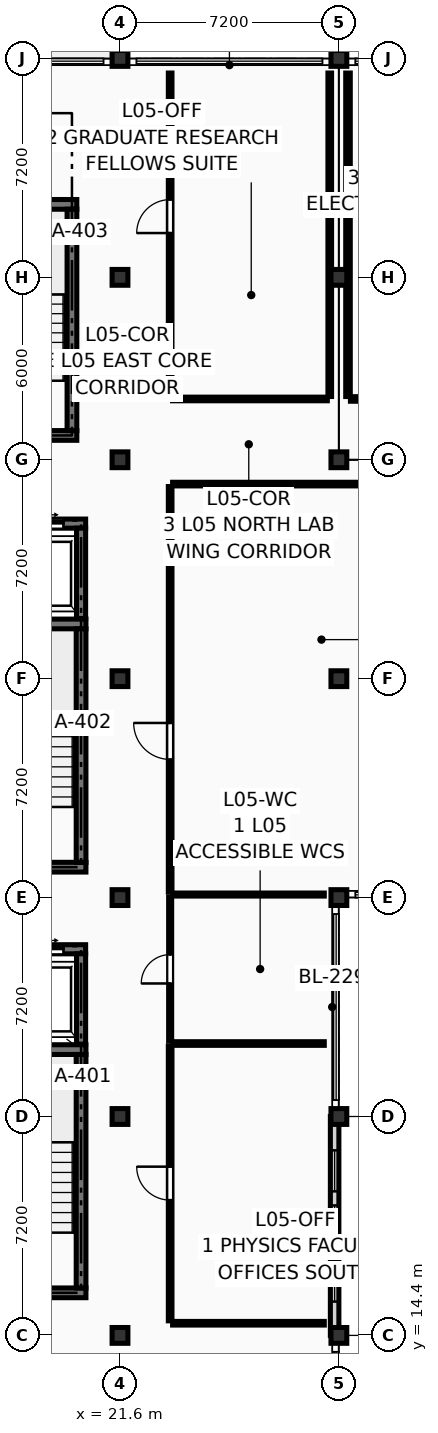
"""IFC4 building model, lengths in metres.
Left out: names, types, materials, properties, quantities, classifications, styles, units other than length and angle.
Written with IfcOpenShell. Run it as: python <this file> out.ifc"""

import sys

from ifc_helpers import new_model, si_unit, direction, frame, frame_2d, origin, origin_2d, place, context, subcontext, project, spatial, rectangle, extrude, element, fill, save


model = new_model("IFC4")
c1 = context("Model", 3, precision=1e-05, world=origin(), true_north=direction((0.0, 1.0)))
c2 = subcontext(c1, "Body", "Model", "MODEL_VIEW")
j1 = project(units=[si_unit("LENGTHUNIT", "METRE"), si_unit("PLANEANGLEUNIT", "RADIAN")], contexts=[c1])
p1 = place(None, origin())
s1 = spatial("IfcSite", under=j1, at=p1, CompositionType="ELEMENT")
p2 = place(p1, origin())
s2 = spatial("IfcBuilding", under=s1, at=p2, CompositionType="ELEMENT")
p3 = place(p2, frame((0.0, 0.0, 19.35)))
s3 = spatial("IfcBuildingStorey", under=s2, at=p3, CompositionType="ELEMENT", Elevation=19.35)
for number, where, z_axis, x_axis in (
    (1, (21.6, 14.4, 0.0), (0.0, 0.0, 1.0), (1.0, 0.0, 0.0)),
    (2, (21.6, 21.6, 0.0), (0.0, 0.0, 1.0), (1.0, 0.0, 0.0)),
    (3, (21.6, 28.8, 0.0), (0.0, 0.0, 1.0), (1.0, 0.0, 0.0)),
    (4, (21.6, 36.0, 0.0), (0.0, 0.0, 1.0), (1.0, 0.0, 0.0)),
    (5, (21.6, 43.2, 0.0), (0.0, 0.0, 1.0), (1.0, 0.0, 0.0)),
    (6, (21.6, 49.2, 0.0), (0.0, 0.0, 1.0), (1.0, 0.0, 0.0)),
    (7, (21.6, 56.4, 0.0), (0.0, 0.0, 1.0), (1.0, 0.0, 0.0)),
    (8, (28.8, 14.4, 0.0), (0.0, 0.0, 1.0), (1.0, 0.0, 0.0)),
    (9, (28.8, 21.6, 0.0), (0.0, 0.0, 1.0), (1.0, 0.0, 0.0)),
    (10, (28.8, 28.8, 0.0), (0.0, 0.0, 1.0), (1.0, 0.0, 0.0)),
    (11, (28.8, 36.0, 0.0), (0.0, 0.0, 1.0), (1.0, 0.0, 0.0)),
    (12, (28.8, 43.2, 0.0), (0.0, 0.0, 1.0), (1.0, 0.0, 0.0)),
    (13, (28.8, 49.2, 0.0), (0.0, 0.0, 1.0), (1.0, 0.0, 0.0)),
    (14, (28.8, 56.4, 0.0), (0.0, 0.0, 1.0), (1.0, 0.0, 0.0)),
):
    element("IfcColumn", number, at=place(p3, frame(where, z_axis=z_axis, x_axis=x_axis)), inside=s3, PredefinedType="COLUMN", context=c2, shape_type="SweptSolid", body=[
        extrude(rectangle(XDim=0.52, YDim=0.52, at=origin_2d()), origin(), (0.0, 0.0, 1.0), 3.6),
    ])
p4 = place(p3, frame((28.66, 14.4, 0.0), z_axis=(0.0, 0.0, 1.0), x_axis=(0.0, 1.0, 0.0)))
e15 = element("IfcWall", 15, at=p4, inside=s3, PredefinedType="SOLIDWALL", context=c2, shape_type="SweptSolid", body=[
    extrude(rectangle(XDim=7.2, YDim=0.28, at=frame_2d((3.6, 0.0))), origin(), (0.0, 0.0, 1.0), 2.84),
])
p5 = place(p4, frame((1.113, 0.0, 0.18)))
e16 = element("IfcOpeningElement", 16, at=p5, cuts=e15, PredefinedType="OPENING", context=c2, shape_type="SweptSolid", body=[
    extrude(rectangle(XDim=1.35, YDim=2.45, at=frame_2d((0.675, 1.225))), frame((0.0, 0.152, 0.0), z_axis=(0.0, -1.0, 0.0), x_axis=(1.0, 0.0, 0.0)), (0.0, 0.0, 1.0), 0.304),
])
p6 = place(p4, frame((2.925, 0.0, 0.18)))
e17 = element("IfcOpeningElement", 17, at=p6, cuts=e15, PredefinedType="OPENING", context=c2, shape_type="SweptSolid", body=[
    extrude(rectangle(XDim=1.35, YDim=2.45, at=frame_2d((0.675, 1.225))), frame((0.0, 0.152, 0.0), z_axis=(0.0, -1.0, 0.0), x_axis=(1.0, 0.0, 0.0)), (0.0, 0.0, 1.0), 0.304),
])
p7 = place(p4, frame((4.738, 0.0, 0.18)))
e18 = element("IfcOpeningElement", 18, at=p7, cuts=e15, PredefinedType="OPENING", context=c2, shape_type="SweptSolid", body=[
    extrude(rectangle(XDim=1.35, YDim=2.45, at=frame_2d((0.675, 1.225))), frame((0.0, 0.152, 0.0), z_axis=(0.0, -1.0, 0.0), x_axis=(1.0, 0.0, 0.0)), (0.0, 0.0, 1.0), 0.304),
])
for number, where, z_axis, x_axis in (
    (19, (15.64, 15.8, 0.0), (0.0, 0.0, 1.0), (1.0, 0.0, 0.0)),
    (20, (15.64, 23.8, 0.0), (0.0, 0.0, 1.0), (1.0, 0.0, 0.0)),
):
    element("IfcWall", number, at=place(p3, frame(where, z_axis=z_axis, x_axis=x_axis)), inside=s3, PredefinedType="SHEAR", context=c2, shape_type="SweptSolid", body=[
        extrude(rectangle(XDim=4.84, YDim=0.32, at=frame_2d((2.42, 0.0))), origin(), (0.0, 0.0, 1.0), 3.39),
    ])
p8 = place(p3, frame((20.32, 15.96, 0.0), z_axis=(0.0, 0.0, 1.0), x_axis=(0.0, 1.0, 0.0)))
e21 = element("IfcWall", 21, at=p8, inside=s3, PredefinedType="SHEAR", context=c2, shape_type="SweptSolid", body=[
    extrude(rectangle(XDim=7.68, YDim=0.32, at=frame_2d((3.84, 0.0))), origin(), (0.0, 0.0, 1.0), 3.39),
])
for number, where, z_axis, x_axis in (
    (22, (15.64, 29.8, 0.0), (0.0, 0.0, 1.0), (1.0, 0.0, 0.0)),
    (23, (15.64, 37.8, 0.0), (0.0, 0.0, 1.0), (1.0, 0.0, 0.0)),
):
    element("IfcWall", number, at=place(p3, frame(where, z_axis=z_axis, x_axis=x_axis)), inside=s3, PredefinedType="SHEAR", context=c2, shape_type="SweptSolid", body=[
        extrude(rectangle(XDim=4.84, YDim=0.32, at=frame_2d((2.42, 0.0))), origin(), (0.0, 0.0, 1.0), 3.39),
    ])
p9 = place(p3, frame((20.32, 29.96, 0.0), z_axis=(0.0, 0.0, 1.0), x_axis=(0.0, 1.0, 0.0)))
e24 = element("IfcWall", 24, at=p9, inside=s3, PredefinedType="SHEAR", context=c2, shape_type="SweptSolid", body=[
    extrude(rectangle(XDim=7.68, YDim=0.32, at=frame_2d((3.84, 0.0))), origin(), (0.0, 0.0, 1.0), 3.39),
])
for number, where, z_axis, x_axis in (
    (25, (15.74, 44.0, 0.0), (0.0, 0.0, 1.0), (1.0, 0.0, 0.0)),
    (26, (15.74, 51.6, 0.0), (0.0, 0.0, 1.0), (1.0, 0.0, 0.0)),
):
    element("IfcWall", number, at=place(p3, frame(where, z_axis=z_axis, x_axis=x_axis)), inside=s3, PredefinedType="SHEAR", context=c2, shape_type="SweptSolid", body=[
        extrude(rectangle(XDim=4.44, YDim=0.32, at=frame_2d((2.22, 0.0))), origin(), (0.0, 0.0, 1.0), 3.39),
    ])
p10 = place(p3, frame((20.02, 44.16, 0.0), z_axis=(0.0, 0.0, 1.0), x_axis=(0.0, 1.0, 0.0)))
e27 = element("IfcWall", 27, at=p10, inside=s3, PredefinedType="SHEAR", context=c2, shape_type="SweptSolid", body=[
    extrude(rectangle(XDim=7.28, YDim=0.32, at=frame_2d((3.64, 0.0))), origin(), (0.0, 0.0, 1.0), 3.39),
])
p11 = place(p3, frame((17.91, 27.1, 0.0), z_axis=(0.0, 0.0, 1.0), x_axis=(1.0, 0.0, 0.0)))
e28 = element("IfcWall", 28, at=p11, inside=s3, PredefinedType="SHEAR", context=c2, shape_type="SweptSolid", body=[
    extrude(rectangle(XDim=2.56, YDim=0.3, at=frame_2d((1.28, 0.0))), origin(), (0.0, 0.0, 1.0), 3.39),
])
p12 = place(p11, frame((0.73, 0.0, 0.0)))
e29 = element("IfcOpeningElement", 29, at=p12, cuts=e28, PredefinedType="OPENING", context=c2, shape_type="SweptSolid", body=[
    extrude(rectangle(XDim=1.1, YDim=2.2, at=frame_2d((0.55, 1.1))), frame((0.0, 0.162, 0.0), z_axis=(0.0, -1.0, 0.0), x_axis=(1.0, 0.0, 0.0)), (0.0, 0.0, 1.0), 0.324),
])
p13 = place(p3, frame((20.32, 23.98, 0.0), z_axis=(0.0, 0.0, 1.0), x_axis=(0.0, 1.0, 0.0)))
e30 = element("IfcWall", 30, at=p13, inside=s3, PredefinedType="SHEAR", context=c2, shape_type="SweptSolid", body=[
    extrude(rectangle(XDim=2.97, YDim=0.3, at=frame_2d((1.485, 0.0))), origin(), (0.0, 0.0, 1.0), 3.39),
])
p14 = place(p3, frame((17.91, 41.1, 0.0), z_axis=(0.0, 0.0, 1.0), x_axis=(1.0, 0.0, 0.0)))
e31 = element("IfcWall", 31, at=p14, inside=s3, PredefinedType="SHEAR", context=c2, shape_type="SweptSolid", body=[
    extrude(rectangle(XDim=2.56, YDim=0.3, at=frame_2d((1.28, 0.0))), origin(), (0.0, 0.0, 1.0), 3.39),
])
p15 = place(p14, frame((0.73, 0.0, 0.0)))
e32 = element("IfcOpeningElement", 32, at=p15, cuts=e31, PredefinedType="OPENING", context=c2, shape_type="SweptSolid", body=[
    extrude(rectangle(XDim=1.1, YDim=2.2, at=frame_2d((0.55, 1.1))), frame((0.0, 0.162, 0.0), z_axis=(0.0, -1.0, 0.0), x_axis=(1.0, 0.0, 0.0)), (0.0, 0.0, 1.0), 0.324),
])
p16 = place(p3, frame((20.32, 37.98, 0.0), z_axis=(0.0, 0.0, 1.0), x_axis=(0.0, 1.0, 0.0)))
e33 = element("IfcWall", 33, at=p16, inside=s3, PredefinedType="SHEAR", context=c2, shape_type="SweptSolid", body=[
    extrude(rectangle(XDim=2.97, YDim=0.3, at=frame_2d((1.485, 0.0))), origin(), (0.0, 0.0, 1.0), 3.39),
])
p17 = place(p3, frame((23.25, 14.88, 0.0), z_axis=(0.0, 0.0, 1.0), x_axis=(0.0, 1.0, 0.0)))
e34 = element("IfcWall", 34, at=p17, inside=s3, PredefinedType="PARTITIONING", context=c2, shape_type="SweptSolid", body=[
    extrude(rectangle(XDim=9.04, YDim=0.12, at=frame_2d((4.52, 0.0))), origin(), (0.0, 0.0, 1.0), 3.375),
])
p18 = place(p17, frame((3.97, 0.0, 0.0)))
e35 = element("IfcOpeningElement", 35, at=p18, cuts=e34, PredefinedType="OPENING", context=c2, shape_type="SweptSolid", body=[
    extrude(rectangle(XDim=1.1, YDim=2.15, at=frame_2d((0.55, 1.075))), frame((0.0, 0.072, 0.0), z_axis=(0.0, -1.0, 0.0), x_axis=(1.0, 0.0, 0.0)), (0.0, 0.0, 1.0), 0.144),
])
for number, where, z_axis, x_axis in (
    (36, (23.33, 14.8, 0.0), (0.0, 0.0, 1.0), (1.0, 0.0, 0.0)),
    (37, (23.33, 24.0, 0.0), (0.0, 0.0, 1.0), (1.0, 0.0, 0.0)),
):
    element("IfcWall", number, at=place(p3, frame(where, z_axis=z_axis, x_axis=x_axis)), inside=s3, PredefinedType="PARTITIONING", context=c2, shape_type="SweptSolid", body=[
        extrude(rectangle(XDim=4.99, YDim=0.12, at=frame_2d((2.495, 0.0))), origin(), (0.0, 0.0, 1.0), 3.375),
    ])
p19 = place(p3, frame((23.25, 24.08, 0.0), z_axis=(0.0, 0.0, 1.0), x_axis=(0.0, 1.0, 0.0)))
e38 = element("IfcWall", 38, at=p19, inside=s3, PredefinedType="PARTITIONING", context=c2, shape_type="SweptSolid", body=[
    extrude(rectangle(XDim=4.74, YDim=0.1, at=frame_2d((2.37, 0.0))), origin(), (0.0, 0.0, 1.0), 3.375),
])
p20 = place(p19, frame((1.895, 0.0, 0.0)))
e39 = element("IfcOpeningElement", 39, at=p20, cuts=e38, PredefinedType="OPENING", context=c2, shape_type="SweptSolid", body=[
    extrude(rectangle(XDim=0.95, YDim=2.1, at=frame_2d((0.475, 1.05))), frame((0.0, 0.062, 0.0), z_axis=(0.0, -1.0, 0.0), x_axis=(1.0, 0.0, 0.0)), (0.0, 0.0, 1.0), 0.124),
])
p21 = place(p3, frame((23.33, 28.9, 0.0), z_axis=(0.0, 0.0, 1.0), x_axis=(1.0, 0.0, 0.0)))
e40 = element("IfcWall", 40, at=p21, inside=s3, PredefinedType="PARTITIONING", context=c2, shape_type="SweptSolid", body=[
    extrude(rectangle(XDim=4.99, YDim=0.1, at=frame_2d((2.495, 0.0))), origin(), (0.0, 0.0, 1.0), 2.691),
])
p22 = place(p3, frame((23.25, 28.98, 0.0), z_axis=(0.0, 0.0, 1.0), x_axis=(0.0, 1.0, 0.0)))
e41 = element("IfcWall", 41, at=p22, inside=s3, PredefinedType="PARTITIONING", context=c2, shape_type="SweptSolid", body=[
    extrude(rectangle(XDim=13.34, YDim=0.12, at=frame_2d((6.67, 0.0))), origin(), (0.0, 0.0, 1.0), 3.375),
])
p23 = place(p22, frame((4.364, 0.0, 0.0)))
e42 = element("IfcOpeningElement", 42, at=p23, cuts=e41, PredefinedType="OPENING", context=c2, shape_type="SweptSolid", body=[
    extrude(rectangle(XDim=1.2, YDim=2.15, at=frame_2d((0.6, 1.075))), frame((0.0, 0.072, 0.0), z_axis=(0.0, -1.0, 0.0), x_axis=(1.0, 0.0, 0.0)), (0.0, 0.0, 1.0), 0.144),
])
p24 = place(p3, frame((23.33, 42.4, 0.0), z_axis=(0.0, 0.0, 1.0), x_axis=(1.0, 0.0, 0.0)))
e43 = element("IfcWall", 43, at=p24, inside=s3, PredefinedType="PARTITIONING", context=c2, shape_type="SweptSolid", body=[
    extrude(rectangle(XDim=9.69, YDim=0.12, at=frame_2d((4.845, 0.0))), origin(), (0.0, 0.0, 1.0), 3.375),
])
p25 = place(p3, frame((29.1, 45.28, 0.0), z_axis=(0.0, 0.0, 1.0), x_axis=(0.0, 1.0, 0.0)))
e44 = element("IfcWall", 44, at=p25, inside=s3, PredefinedType="PARTITIONING", context=c2, shape_type="SweptSolid", body=[
    extrude(rectangle(XDim=10.64, YDim=0.15, at=frame_2d((5.32, 0.0))), origin(), (0.0, 0.0, 1.0), 2.715),
])
p26 = place(p3, frame((29.18, 45.2, 0.0), z_axis=(0.0, 0.0, 1.0), x_axis=(1.0, 0.0, 0.0)))
e45 = element("IfcWall", 45, at=p26, inside=s3, PredefinedType="PARTITIONING", context=c2, shape_type="SweptSolid", body=[
    extrude(rectangle(XDim=8.54, YDim=0.15, at=frame_2d((4.27, 0.0))), origin(), (0.0, 0.0, 1.0), 3.375),
])
p27 = place(p26, frame((3.52, 0.0, 0.0)))
e46 = element("IfcOpeningElement", 46, at=p27, cuts=e45, PredefinedType="OPENING", context=c2, shape_type="SweptSolid", body=[
    extrude(rectangle(XDim=1.5, YDim=2.2, at=frame_2d((0.75, 1.1))), frame((0.0, 0.087, 0.0), z_axis=(0.0, -1.0, 0.0), x_axis=(1.0, 0.0, 0.0)), (0.0, 0.0, 1.0), 0.174),
])
p28 = place(p3, frame((23.25, 45.28, 0.0), z_axis=(0.0, 0.0, 1.0), x_axis=(0.0, 1.0, 0.0)))
e47 = element("IfcWall", 47, at=p28, inside=s3, PredefinedType="PARTITIONING", context=c2, shape_type="SweptSolid", body=[
    extrude(rectangle(XDim=10.64, YDim=0.12, at=frame_2d((5.32, 0.0))), origin(), (0.0, 0.0, 1.0), 3.375),
])
p29 = place(p28, frame((5.377, 0.0, 0.0)))
e48 = element("IfcOpeningElement", 48, at=p29, cuts=e47, PredefinedType="OPENING", context=c2, shape_type="SweptSolid", body=[
    extrude(rectangle(XDim=1.1, YDim=2.15, at=frame_2d((0.55, 1.075))), frame((0.0, 0.072, 0.0), z_axis=(0.0, -1.0, 0.0), x_axis=(1.0, 0.0, 0.0)), (0.0, 0.0, 1.0), 0.144),
])
p30 = place(p3, frame((23.33, 45.2, 0.0), z_axis=(0.0, 0.0, 1.0), x_axis=(1.0, 0.0, 0.0)))
e49 = element("IfcWall", 49, at=p30, inside=s3, PredefinedType="PARTITIONING", context=c2, shape_type="SweptSolid", body=[
    extrude(rectangle(XDim=5.09, YDim=0.12, at=frame_2d((2.545, 0.0))), origin(), (0.0, 0.0, 1.0), 3.375),
])
p31 = place(p3, frame((28.5, 45.28, 0.0), z_axis=(0.0, 0.0, 1.0), x_axis=(0.0, 1.0, 0.0)))
e50 = element("IfcWall", 50, at=p31, inside=s3, PredefinedType="PARTITIONING", context=c2, shape_type="SweptSolid", body=[
    extrude(rectangle(XDim=10.64, YDim=0.12, at=frame_2d((5.32, 0.0))), origin(), (0.0, 0.0, 1.0), 2.715),
])
p32 = place(p5, origin())
e51 = element("IfcWindow", 51, at=p32, inside=s3, PartitioningType="SINGLE_PANEL", PredefinedType="WINDOW", context=c2, shape_type="SweptSolid", body=[
    extrude(rectangle(XDim=1.35, YDim=2.45, at=frame_2d((0.675, 1.225))), frame((0.0, 0.03, 0.0), z_axis=(0.0, -1.0, 0.0), x_axis=(1.0, 0.0, 0.0)), (0.0, 0.0, 1.0), 0.06),
])
fill(e16, e51)
p33 = place(p6, origin())
e52 = element("IfcWindow", 52, at=p33, inside=s3, PartitioningType="SINGLE_PANEL", PredefinedType="WINDOW", context=c2, shape_type="SweptSolid", body=[
    extrude(rectangle(XDim=1.35, YDim=2.45, at=frame_2d((0.675, 1.225))), frame((0.0, 0.03, 0.0), z_axis=(0.0, -1.0, 0.0), x_axis=(1.0, 0.0, 0.0)), (0.0, 0.0, 1.0), 0.06),
])
fill(e17, e52)
p34 = place(p7, origin())
e53 = element("IfcWindow", 53, at=p34, inside=s3, PartitioningType="SINGLE_PANEL", PredefinedType="WINDOW", context=c2, shape_type="SweptSolid", body=[
    extrude(rectangle(XDim=1.35, YDim=2.45, at=frame_2d((0.675, 1.225))), frame((0.0, 0.03, 0.0), z_axis=(0.0, -1.0, 0.0), x_axis=(1.0, 0.0, 0.0)), (0.0, 0.0, 1.0), 0.06),
])
fill(e18, e53)
p35 = place(p12, origin())
e54 = element("IfcDoor", 54, at=p35, inside=s3, OperationType="DOUBLE_DOOR_SLIDING", PredefinedType="DOOR", context=c2, shape_type="SweptSolid", body=[
    extrude(rectangle(XDim=1.1, YDim=2.2, at=frame_2d((0.55, 1.1))), frame((0.0, 0.025, 0.0), z_axis=(0.0, -1.0, 0.0), x_axis=(1.0, 0.0, 0.0)), (0.0, 0.0, 1.0), 0.05),
])
fill(e29, e54)
p36 = place(p15, origin())
e55 = element("IfcDoor", 55, at=p36, inside=s3, OperationType="DOUBLE_DOOR_SLIDING", PredefinedType="DOOR", context=c2, shape_type="SweptSolid", body=[
    extrude(rectangle(XDim=1.1, YDim=2.2, at=frame_2d((0.55, 1.1))), frame((0.0, 0.025, 0.0), z_axis=(0.0, -1.0, 0.0), x_axis=(1.0, 0.0, 0.0)), (0.0, 0.0, 1.0), 0.05),
])
fill(e32, e55)
p37 = place(p18, origin())
e56 = element("IfcDoor", 56, at=p37, inside=s3, OperationType="SINGLE_SWING_RIGHT", PredefinedType="DOOR", context=c2, shape_type="SweptSolid", body=[
    extrude(rectangle(XDim=1.1, YDim=2.15, at=frame_2d((0.55, 1.075))), frame((0.0, 0.025, 0.0), z_axis=(0.0, -1.0, 0.0), x_axis=(1.0, 0.0, 0.0)), (0.0, 0.0, 1.0), 0.05),
])
fill(e35, e56)
p38 = place(p20, origin())
e57 = element("IfcDoor", 57, at=p38, inside=s3, OperationType="SINGLE_SWING_LEFT", PredefinedType="DOOR", context=c2, shape_type="SweptSolid", body=[
    extrude(rectangle(XDim=0.95, YDim=2.1, at=frame_2d((0.475, 1.05))), frame((0.0, 0.025, 0.0), z_axis=(0.0, -1.0, 0.0), x_axis=(1.0, 0.0, 0.0)), (0.0, 0.0, 1.0), 0.05),
])
fill(e39, e57)
p39 = place(p23, origin())
e58 = element("IfcDoor", 58, at=p39, inside=s3, OperationType="SINGLE_SWING_RIGHT", PredefinedType="DOOR", context=c2, shape_type="SweptSolid", body=[
    extrude(rectangle(XDim=1.2, YDim=2.15, at=frame_2d((0.6, 1.075))), frame((0.0, 0.025, 0.0), z_axis=(0.0, -1.0, 0.0), x_axis=(1.0, 0.0, 0.0)), (0.0, 0.0, 1.0), 0.05),
])
fill(e42, e58)
p40 = place(p29, origin())
e59 = element("IfcDoor", 59, at=p40, inside=s3, OperationType="SINGLE_SWING_LEFT", PredefinedType="DOOR", context=c2, shape_type="SweptSolid", body=[
    extrude(rectangle(XDim=1.1, YDim=2.15, at=frame_2d((0.55, 1.075))), frame((0.0, 0.025, 0.0), z_axis=(0.0, -1.0, 0.0), x_axis=(1.0, 0.0, 0.0)), (0.0, 0.0, 1.0), 0.05),
])
fill(e48, e59)
save(model, sys.argv[1])
